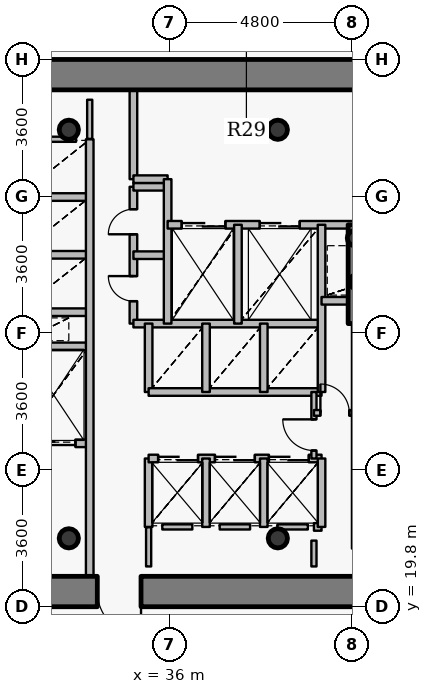
"""IFC4 building model, lengths in metres.
Left out: names, types, materials, properties, quantities, classifications, styles, units other than length and angle.
Written with IfcOpenShell. Run it as: python <this file> out.ifc"""

import sys

from ifc_helpers import new_model, si_unit, direction, frame, frame_2d, origin, origin_2d, place, context, subcontext, project, spatial, rectangle, hollow_circle, extrude, source, transform, mapped, element, fill, save


model = new_model("IFC4")
c1 = context("Model", 3, precision=1e-05, world=origin(), true_north=direction((0.0, 1.0)))
c2 = subcontext(c1, "Body", "Model", "MODEL_VIEW")
j1 = project(units=[si_unit("LENGTHUNIT", "METRE"), si_unit("PLANEANGLEUNIT", "RADIAN")], contexts=[c1])
p1 = place(None, origin())
s1 = spatial("IfcSite", under=j1, at=p1, CompositionType="ELEMENT")
p2 = place(p1, origin())
s2 = spatial("IfcBuilding", under=s1, at=p2, CompositionType="ELEMENT")
p3 = place(p2, frame((0.0, 0.0, 115.95)))
s3 = spatial("IfcBuildingStorey", under=s2, at=p3, CompositionType="ELEMENT", Elevation=115.95)
for number, where, z_axis, x_axis in (
    (1, (33.35, 21.6, 0.0), (0.0, 0.0, 1.0), (1.0, 0.0, 0.0)),
    (2, (38.85, 21.6, 0.0), (0.0, 0.0, 1.0), (1.0, 0.0, 0.0)),
    (3, (38.85, 32.35, 0.0), (0.0, 0.0, 1.0), (1.0, 0.0, 0.0)),
    (4, (33.35, 32.35, 0.0), (0.0, 0.0, 1.0), (1.0, 0.0, 0.0)),
):
    element("IfcColumn", number, at=place(p3, frame(where, z_axis=z_axis, x_axis=x_axis)), inside=s3, PredefinedType="COLUMN", context=c2, shape_type="SweptSolid", body=[
        extrude(hollow_circle(Radius=0.254, WallThickness=0.02, at=origin_2d()), origin(), (0.0, 0.0, 1.0), 3.75),
    ])
for number, where, z_axis, x_axis in (
    (5, (40.95, 28.35, 0.0), (0.0, 0.0, 1.0), (1.0, 0.0, 0.0)),
    (6, (40.88, 29.5, 0.0), (0.0, 0.0, 1.0), (1.0, 0.0, 0.0)),
):
    element("IfcColumn", number, at=place(p3, frame(where, z_axis=z_axis, x_axis=x_axis)), inside=s3, PredefinedType="COLUMN", context=c2, shape_type="SweptSolid", body=[
        extrude(hollow_circle(Radius=0.203, WallThickness=0.016, at=origin_2d()), origin(), (0.0, 0.0, 1.0), 3.75),
    ])
p4 = place(p3, frame((26.6, 33.8, 0.0), z_axis=(0.0, 0.0, 1.0), x_axis=(1.0, 0.0, 0.0)))
e7 = element("IfcWall", 7, at=p4, inside=s3, PredefinedType="SHEAR", context=c2, shape_type="SweptSolid", body=[
    extrude(rectangle(XDim=18.8, YDim=0.8, at=frame_2d((9.4, 0.0))), origin(), (0.0, 0.0, 1.0), 2.95),
])
p5 = place(p3, frame((45.4, 20.2, 0.0), z_axis=(0.0, 0.0, 1.0), x_axis=(-1.0, 0.0, 0.0)))
e8 = element("IfcWall", 8, at=p5, inside=s3, PredefinedType="SHEAR", context=c2, shape_type="SweptSolid", body=[
    extrude(rectangle(XDim=18.8, YDim=0.8, at=frame_2d((9.4, 0.0))), origin(), (0.0, 0.0, 1.0), 2.95),
])
p6 = place(p5, frame((10.15, 0.0, 0.0)))
e9 = element("IfcOpeningElement", 9, at=p6, cuts=e8, PredefinedType="OPENING", context=c2, shape_type="SweptSolid", body=[
    extrude(rectangle(XDim=1.15, YDim=2.15, at=origin_2d()), frame((0.575, 0.41, 1.075), z_axis=(0.0, -1.0, 0.0), x_axis=(1.0, 0.0, 0.0)), (0.0, 0.0, 1.0), 0.82),
])
p7 = place(p3, frame((40.9, 27.25, 0.0), z_axis=(0.0, 0.0, 1.0), x_axis=(0.0, 1.0, 0.0)))
e10 = element("IfcWall", 10, at=p7, inside=s3, PredefinedType="SHEAR", context=c2, shape_type="SweptSolid", body=[
    extrude(rectangle(XDim=2.6, YDim=0.4, at=frame_2d((1.3, 0.0))), origin(), (0.0, 0.0, 1.0), 3.1),
])
p8 = place(p3, frame((32.0, 24.1, 0.0), z_axis=(0.0, 0.0, 1.0), x_axis=(1.0, 0.0, 0.0)))
e11 = element("IfcWall", 11, at=p8, inside=s3, PredefinedType="PARTITIONING", context=c2, shape_type="SweptSolid", body=[
    extrude(rectangle(XDim=1.9, YDim=0.2, at=frame_2d((0.95, 0.0))), origin(), (0.0, 0.0, 1.0), 3.085),
])
p9 = place(p8, frame((0.375, 0.0, 0.0)))
e12 = element("IfcOpeningElement", 12, at=p9, cuts=e11, PredefinedType="OPENING", context=c2, shape_type="SweptSolid", body=[
    extrude(rectangle(XDim=1.15, YDim=2.15, at=origin_2d()), frame((0.575, 0.11, 1.075), z_axis=(0.0, -1.0, 0.0), x_axis=(1.0, 0.0, 0.0)), (0.0, 0.0, 1.0), 0.22),
])
for number, where, z_axis, x_axis in (
    (13, (32.0, 26.65, 0.0), (0.0, 0.0, 1.0), (1.0, 0.0, 0.0)),
    (14, (32.0, 27.55, 0.0), (0.0, 0.0, 1.0), (1.0, 0.0, 0.0)),
    (15, (32.0, 29.06, 0.0), (0.0, 0.0, 1.0), (1.0, 0.0, 0.0)),
    (16, (32.0, 30.58, 0.0), (0.0, 0.0, 1.0), (1.0, 0.0, 0.0)),
):
    element("IfcWall", number, at=place(p3, frame(where, z_axis=z_axis, x_axis=x_axis)), inside=s3, PredefinedType="PARTITIONING", context=c2, shape_type="SweptSolid", body=[
        extrude(rectangle(XDim=1.9, YDim=0.2, at=frame_2d((0.95, 0.0))), origin(), (0.0, 0.0, 1.0), 3.085),
    ])
p10 = place(p3, frame((33.9, 20.6, 0.0), z_axis=(0.0, 0.0, 1.0), x_axis=(0.0, 1.0, 0.0)))
e17 = element("IfcWall", 17, at=p10, inside=s3, PredefinedType="PARTITIONING", context=c2, shape_type="SweptSolid", body=[
    extrude(rectangle(XDim=11.5, YDim=0.2, at=frame_2d((5.75, 0.0))), origin(), (0.0, 0.0, 1.0), 3.085),
])
p11 = place(p3, frame((35.05, 27.25, 0.0), z_axis=(0.0, 0.0, 1.0), x_axis=(0.0, 1.0, 0.0)))
e18 = element("IfcWall", 18, at=p11, inside=s3, PredefinedType="PARTITIONING", context=c2, shape_type="SweptSolid", body=[
    extrude(rectangle(XDim=3.6, YDim=0.2, at=frame_2d((1.8, 0.0))), origin(), (0.0, 0.0, 1.0), 3.5),
])
p12 = place(p11, frame((0.59, 0.0, 0.0)))
e19 = element("IfcOpeningElement", 19, at=p12, cuts=e18, PredefinedType="OPENING", context=c2, shape_type="SweptSolid", body=[
    extrude(rectangle(XDim=0.66, YDim=2.05, at=origin_2d()), frame((0.33, 0.11, 1.025), z_axis=(0.0, -1.0, 0.0), x_axis=(1.0, 0.0, 0.0)), (0.0, 0.0, 1.0), 0.22),
])
p13 = place(p11, frame((2.35, 0.0, 0.0)))
e20 = element("IfcOpeningElement", 20, at=p13, cuts=e18, PredefinedType="OPENING", context=c2, shape_type="SweptSolid", body=[
    extrude(rectangle(XDim=0.66, YDim=2.05, at=origin_2d()), frame((0.33, 0.11, 1.025), z_axis=(0.0, -1.0, 0.0), x_axis=(1.0, 0.0, 0.0)), (0.0, 0.0, 1.0), 0.22),
])
p14 = place(p3, frame((35.05, 27.25, 0.0), z_axis=(0.0, 0.0, 1.0), x_axis=(1.0, 0.0, 0.0)))
e21 = element("IfcWall", 21, at=p14, inside=s3, PredefinedType="PARTITIONING", context=c2, shape_type="SweptSolid", body=[
    extrude(rectangle(XDim=4.95, YDim=0.2, at=frame_2d((2.475, 0.0))), origin(), (0.0, 0.0, 1.0), 3.085),
])
for number, where, z_axis, x_axis in (
    (22, (35.05, 29.05, 0.0), (0.0, 0.0, 1.0), (1.0, 0.0, 0.0)),
    (23, (35.05, 30.85, 0.0), (0.0, 0.0, 1.0), (1.0, 0.0, 0.0)),
):
    element("IfcWall", number, at=place(p3, frame(where, z_axis=z_axis, x_axis=x_axis)), inside=s3, PredefinedType="PARTITIONING", context=c2, shape_type="SweptSolid", body=[
        extrude(rectangle(XDim=0.9, YDim=0.2, at=frame_2d((0.45, 0.0))), origin(), (0.0, 0.0, 1.0), 3.5),
    ])
p15 = place(p3, frame((35.05, 31.05, 0.0), z_axis=(0.0, 0.0, 1.0), x_axis=(0.0, 1.0, 0.0)))
e24 = element("IfcWall", 24, at=p15, inside=s3, PredefinedType="PARTITIONING", context=c2, shape_type="SweptSolid", body=[
    extrude(rectangle(XDim=2.35, YDim=0.2, at=frame_2d((1.175, 0.0))), origin(), (0.0, 0.0, 1.0), 3.085),
])
p16 = place(p3, frame((35.05, 31.05, 0.0), z_axis=(0.0, 0.0, 1.0), x_axis=(1.0, 0.0, 0.0)))
e25 = element("IfcWall", 25, at=p16, inside=s3, PredefinedType="PARTITIONING", context=c2, shape_type="SweptSolid", body=[
    extrude(rectangle(XDim=0.9, YDim=0.2, at=frame_2d((0.45, 0.0))), origin(), (0.0, 0.0, 1.0), 3.5),
])
p17 = place(p3, frame((35.45, 21.9, 0.0), z_axis=(0.0, 0.0, 1.0), x_axis=(0.0, 1.0, 0.0)))
e26 = element("IfcWall", 26, at=p17, inside=s3, PredefinedType="PARTITIONING", context=c2, shape_type="SweptSolid", body=[
    extrude(rectangle(XDim=1.8, YDim=0.2, at=frame_2d((0.9, 0.0))), origin(), (0.0, 0.0, 1.0), 3.5),
])
p18 = place(p3, frame((35.45, 23.7, 0.0), z_axis=(0.0, 0.0, 1.0), x_axis=(1.0, 0.0, 0.0)))
e27 = element("IfcWall", 27, at=p18, inside=s3, PredefinedType="PARTITIONING", context=c2, shape_type="SweptSolid", body=[
    extrude(rectangle(XDim=4.55, YDim=0.2, at=frame_2d((2.275, 0.0))), origin(), (0.0, 0.0, 1.0), 3.085),
])
p19 = place(p18, frame((0.25, 0.0, 0.0)))
e28 = element("IfcOpeningElement", 28, at=p19, cuts=e27, PredefinedType="OPENING", context=c2, shape_type="SweptSolid", body=[
    extrude(rectangle(XDim=1.05, YDim=2.15, at=origin_2d()), frame((0.525, 0.11, 1.075), z_axis=(0.0, -1.0, 0.0), x_axis=(1.0, 0.0, 0.0)), (0.0, 0.0, 1.0), 0.22),
])
p20 = place(p18, frame((1.745, 0.0, 0.0)))
e29 = element("IfcOpeningElement", 29, at=p20, cuts=e27, PredefinedType="OPENING", context=c2, shape_type="SweptSolid", body=[
    extrude(rectangle(XDim=1.05, YDim=2.15, at=origin_2d()), frame((0.525, 0.11, 1.075), z_axis=(0.0, -1.0, 0.0), x_axis=(1.0, 0.0, 0.0)), (0.0, 0.0, 1.0), 0.22),
])
p21 = place(p18, frame((3.165, 0.0, 0.0)))
e30 = element("IfcOpeningElement", 30, at=p21, cuts=e27, PredefinedType="OPENING", context=c2, shape_type="SweptSolid", body=[
    extrude(rectangle(XDim=1.05, YDim=2.15, at=origin_2d()), frame((0.525, 0.11, 1.075), z_axis=(0.0, -1.0, 0.0), x_axis=(1.0, 0.0, 0.0)), (0.0, 0.0, 1.0), 0.22),
])
p22 = place(p3, frame((35.45, 25.45, 0.0), z_axis=(0.0, 0.0, 1.0), x_axis=(0.0, 1.0, 0.0)))
e31 = element("IfcWall", 31, at=p22, inside=s3, PredefinedType="PARTITIONING", context=c2, shape_type="SweptSolid", body=[
    extrude(rectangle(XDim=1.8, YDim=0.2, at=frame_2d((0.9, 0.0))), origin(), (0.0, 0.0, 1.0), 3.5),
])
p23 = place(p3, frame((35.45, 25.45, 0.0), z_axis=(0.0, 0.0, 1.0), x_axis=(1.0, 0.0, 0.0)))
e32 = element("IfcWall", 32, at=p23, inside=s3, PredefinedType="PARTITIONING", context=c2, shape_type="SweptSolid", body=[
    extrude(rectangle(XDim=4.55, YDim=0.2, at=frame_2d((2.275, 0.0))), origin(), (0.0, 0.0, 1.0), 3.085),
])
p24 = place(p3, frame((35.95, 27.25, 0.0), z_axis=(0.0, 0.0, 1.0), x_axis=(0.0, 1.0, 0.0)))
e33 = element("IfcWall", 33, at=p24, inside=s3, PredefinedType="PARTITIONING", context=c2, shape_type="SweptSolid", body=[
    extrude(rectangle(XDim=3.8, YDim=0.2, at=frame_2d((1.9, 0.0))), origin(), (0.0, 0.0, 1.0), 3.5),
])
p25 = place(p3, frame((35.95, 29.85, 0.0), z_axis=(0.0, 0.0, 1.0), x_axis=(1.0, 0.0, 0.0)))
e34 = element("IfcWall", 34, at=p25, inside=s3, PredefinedType="PARTITIONING", context=c2, shape_type="SweptSolid", body=[
    extrude(rectangle(XDim=8.49, YDim=0.2, at=frame_2d((4.245, 0.0))), origin(), (0.0, 0.0, 1.0), 3.085),
])
p26 = place(p25, frame((6.1, 0.0, 0.0)))
e35 = element("IfcOpeningElement", 35, at=p26, cuts=e34, PredefinedType="OPENING", context=c2, shape_type="SweptSolid", body=[
    extrude(rectangle(XDim=1.2, YDim=2.15, at=origin_2d()), frame((0.6, 0.11, 1.075), z_axis=(0.0, -1.0, 0.0), x_axis=(1.0, 0.0, 0.0)), (0.0, 0.0, 1.0), 0.22),
])
p27 = place(p25, frame((0.37, 0.0, 0.0)))
e36 = element("IfcOpeningElement", 36, at=p27, cuts=e34, PredefinedType="OPENING", context=c2, shape_type="SweptSolid", body=[
    extrude(rectangle(XDim=1.15, YDim=2.15, at=origin_2d()), frame((0.575, 0.11, 1.075), z_axis=(0.0, -1.0, 0.0), x_axis=(1.0, 0.0, 0.0)), (0.0, 0.0, 1.0), 0.22),
])
p28 = place(p25, frame((2.425, 0.0, 0.0)))
e37 = element("IfcOpeningElement", 37, at=p28, cuts=e34, PredefinedType="OPENING", context=c2, shape_type="SweptSolid", body=[
    extrude(rectangle(XDim=1.05, YDim=2.15, at=origin_2d()), frame((0.525, 0.11, 1.075), z_axis=(0.0, -1.0, 0.0), x_axis=(1.0, 0.0, 0.0)), (0.0, 0.0, 1.0), 0.22),
])
for number, where, z_axis, x_axis in (
    (38, (36.96, 21.9, 0.0), (0.0, 0.0, 1.0), (0.0, 1.0, 0.0)),
    (39, (36.96, 25.45, 0.0), (0.0, 0.0, 1.0), (0.0, 1.0, 0.0)),
):
    element("IfcWall", number, at=place(p3, frame(where, z_axis=z_axis, x_axis=x_axis)), inside=s3, PredefinedType="PARTITIONING", context=c2, shape_type="SweptSolid", body=[
        extrude(rectangle(XDim=1.8, YDim=0.2, at=frame_2d((0.9, 0.0))), origin(), (0.0, 0.0, 1.0), 3.5),
    ])
p29 = place(p3, frame((37.8, 27.25, 0.0), z_axis=(0.0, 0.0, 1.0), x_axis=(0.0, 1.0, 0.0)))
e40 = element("IfcWall", 40, at=p29, inside=s3, PredefinedType="PARTITIONING", context=c2, shape_type="SweptSolid", body=[
    extrude(rectangle(XDim=2.6, YDim=0.2, at=frame_2d((1.3, 0.0))), origin(), (0.0, 0.0, 1.0), 3.5),
])
for number, where, z_axis, x_axis in (
    (41, (38.48, 21.9, 0.0), (0.0, 0.0, 1.0), (0.0, 1.0, 0.0)),
    (42, (38.48, 25.45, 0.0), (0.0, 0.0, 1.0), (0.0, 1.0, 0.0)),
):
    element("IfcWall", number, at=place(p3, frame(where, z_axis=z_axis, x_axis=x_axis)), inside=s3, PredefinedType="PARTITIONING", context=c2, shape_type="SweptSolid", body=[
        extrude(rectangle(XDim=1.8, YDim=0.2, at=frame_2d((0.9, 0.0))), origin(), (0.0, 0.0, 1.0), 3.5),
    ])
p30 = place(p3, frame((39.8, 21.9, 0.0), z_axis=(0.0, 0.0, 1.0), x_axis=(1.0, 0.0, 0.0)))
e43 = element("IfcWall", 43, at=p30, inside=s3, PredefinedType="PARTITIONING", context=c2, shape_type="SweptSolid", body=[
    extrude(rectangle(XDim=0.2, YDim=0.2, at=frame_2d((0.1, 0.0))), origin(), (0.0, 0.0, 1.0), 3.5),
])
p31 = place(p3, frame((39.8, 23.7, 0.0), z_axis=(0.0, 0.0, 1.0), x_axis=(0.0, 1.0, 0.0)))
e44 = element("IfcWall", 44, at=p31, inside=s3, PredefinedType="PARTITIONING", context=c2, shape_type="SweptSolid", body=[
    extrude(rectangle(XDim=1.75, YDim=0.135, at=frame_2d((0.875, 0.0))), origin(), (0.0, 0.0, 1.0), 3.5),
])
p32 = place(p31, frame((0.21, 0.0, 0.0)))
e45 = element("IfcOpeningElement", 45, at=p32, cuts=e44, PredefinedType="OPENING", context=c2, shape_type="SweptSolid", body=[
    extrude(rectangle(XDim=0.82, YDim=2.1, at=origin_2d()), frame((0.41, 0.078, 1.05), z_axis=(0.0, -1.0, 0.0), x_axis=(1.0, 0.0, 0.0)), (0.0, 0.0, 1.0), 0.155),
])
p33 = place(p3, frame((39.8, 24.9, 0.0), z_axis=(0.0, 0.0, 1.0), x_axis=(1.0, 0.0, 0.0)))
e46 = element("IfcWall", 46, at=p33, inside=s3, PredefinedType="PARTITIONING", context=c2, shape_type="SweptSolid", body=[
    extrude(rectangle(XDim=1.1, YDim=0.15, at=frame_2d((0.55, 0.0))), origin(), (0.0, 0.0, 1.0), 3.5),
])
p34 = place(p33, frame((0.17, 0.0, 0.0)))
e47 = element("IfcOpeningElement", 47, at=p34, cuts=e46, PredefinedType="OPENING", context=c2, shape_type="SweptSolid", body=[
    extrude(rectangle(XDim=0.76, YDim=2.1, at=origin_2d()), frame((0.38, 0.085, 1.05), z_axis=(0.0, -1.0, 0.0), x_axis=(1.0, 0.0, 0.0)), (0.0, 0.0, 1.0), 0.17),
])
p35 = place(p3, frame((40.0, 21.9, 0.0), z_axis=(0.0, 0.0, 1.0), x_axis=(0.0, 1.0, 0.0)))
e48 = element("IfcWall", 48, at=p35, inside=s3, PredefinedType="PARTITIONING", context=c2, shape_type="SweptSolid", body=[
    extrude(rectangle(XDim=1.8, YDim=0.2, at=frame_2d((0.9, 0.0))), origin(), (0.0, 0.0, 1.0), 3.5),
])
p36 = place(p3, frame((40.0, 25.45, 0.0), z_axis=(0.0, 0.0, 1.0), x_axis=(0.0, 1.0, 0.0)))
e49 = element("IfcWall", 49, at=p36, inside=s3, PredefinedType="PARTITIONING", context=c2, shape_type="SweptSolid", body=[
    extrude(rectangle(XDim=4.4, YDim=0.2, at=frame_2d((2.2, 0.0))), origin(), (0.0, 0.0, 1.0), 3.5),
])
p37 = place(p3, frame((40.0, 27.85, 0.0), z_axis=(0.0, 0.0, 1.0), x_axis=(1.0, 0.0, 0.0)))
e50 = element("IfcWall", 50, at=p37, inside=s3, PredefinedType="PARTITIONING", context=c2, shape_type="SweptSolid", body=[
    extrude(rectangle(XDim=0.9, YDim=0.2, at=frame_2d((0.45, 0.0))), origin(), (0.0, 0.0, 1.0), 3.5),
])
p38 = place(p3, frame((40.9, 21.33, 0.0), z_axis=(0.0, 0.0, 1.0), x_axis=(0.0, 1.0, 0.0)))
e51 = element("IfcWall", 51, at=p38, inside=s3, PredefinedType="PARTITIONING", context=c2, shape_type="SweptSolid", body=[
    extrude(rectangle(XDim=5.91, YDim=0.2, at=frame_2d((2.955, 0.0))), origin(), (0.0, 0.0, 1.0), 3.035),
])
p39 = place(p3, frame((36.6, 21.9, 0.0), z_axis=(0.0, 0.0, 1.0), x_axis=(-1.0, 0.0, 0.0)))
e52 = element("IfcWall", 52, at=p39, inside=s3, PredefinedType="PARTITIONING", context=c2, shape_type="SweptSolid", body=[
    extrude(rectangle(XDim=0.79, YDim=0.135, at=frame_2d((0.395, 0.0))), origin(), (0.0, 0.0, 1.0), 3.5),
])
p40 = place(p3, frame((38.12, 21.9, 0.0), z_axis=(0.0, 0.0, 1.0), x_axis=(-1.0, 0.0, 0.0)))
e53 = element("IfcWall", 53, at=p40, inside=s3, PredefinedType="PARTITIONING", context=c2, shape_type="SweptSolid", body=[
    extrude(rectangle(XDim=0.8, YDim=0.135, at=frame_2d((0.4, 0.0))), origin(), (0.0, 0.0, 1.0), 3.5),
])
p41 = place(p3, frame((39.64, 21.9, 0.0), z_axis=(0.0, 0.0, 1.0), x_axis=(-1.0, 0.0, 0.0)))
e54 = element("IfcWall", 54, at=p41, inside=s3, PredefinedType="PARTITIONING", context=c2, shape_type="SweptSolid", body=[
    extrude(rectangle(XDim=0.8, YDim=0.135, at=frame_2d((0.4, 0.0))), origin(), (0.0, 0.0, 1.0), 3.085),
])
p42 = place(p3, frame((32.36, 32.1, 0.0), z_axis=(0.0, 0.0, 1.0), x_axis=(1.0, 0.0, 0.0)))
e55 = element("IfcWall", 55, at=p42, inside=s3, PredefinedType="PARTITIONING", context=c2, shape_type="SweptSolid", body=[
    extrude(rectangle(XDim=1.18, YDim=0.135, at=frame_2d((0.59, 0.0))), origin(), (0.0, 0.0, 1.0), 3.085),
])
p43 = place(p3, frame((39.8, 20.86, 0.0), z_axis=(0.0, 0.0, 1.0), x_axis=(0.0, 1.0, 0.0)))
e56 = element("IfcWall", 56, at=p43, inside=s3, PredefinedType="PARTITIONING", context=c2, shape_type="SweptSolid", body=[
    extrude(rectangle(XDim=0.68, YDim=0.135, at=frame_2d((0.34, 0.0))), origin(), (0.0, 0.0, 1.0), 3.035),
])
for number, where, z_axis, x_axis in (
    (57, (35.45, 21.89, 0.0), (0.0, 0.0, 1.0), (0.0, -1.0, 0.0)),
    (58, (33.9, 32.11, 0.0), (0.0, 0.0, 1.0), (0.0, 1.0, 0.0)),
):
    element("IfcWall", number, at=place(p3, frame(where, z_axis=z_axis, x_axis=x_axis)), inside=s3, PredefinedType="PARTITIONING", context=c2, shape_type="SweptSolid", body=[
        extrude(rectangle(XDim=1.03, YDim=0.135, at=frame_2d((0.515, 0.0))), origin(), (0.0, 0.0, 1.0), 3.085),
    ])
m1 = source(origin(), c2, "Body", "SweptSolid", [
    extrude(rectangle(XDim=1.15, YDim=2.15, at=origin_2d()), frame((0.575, 0.025, 1.075), z_axis=(0.0, -1.0, 0.0), x_axis=(1.0, 0.0, 0.0)), (0.0, 0.0, 1.0), 0.05),
])
p44 = place(p6, origin())
e59 = element("IfcDoor", 59, at=p44, inside=s3, OperationType="SINGLE_SWING_LEFT", PredefinedType="DOOR", context=c2, shape_type="MappedRepresentation", body=[
    mapped(m1, transform((0.0, 0.0, 0.0), x_axis=(1.0, 0.0, 0.0), y_axis=(0.0, 1.0, 0.0), z_axis=(0.0, 0.0, 1.0), scale=1.0)),
])
fill(e9, e59)
m2 = source(origin(), c2, "Body", "SweptSolid", [
    extrude(rectangle(XDim=1.15, YDim=2.15, at=origin_2d()), frame((0.575, 0.025, 1.075), z_axis=(0.0, -1.0, 0.0), x_axis=(1.0, 0.0, 0.0)), (0.0, 0.0, 1.0), 0.05),
])
p45 = place(p27, origin())
e60 = element("IfcDoor", 60, at=p45, inside=s3, OperationType="DOUBLE_DOOR_SLIDING", PredefinedType="USERDEFINED", context=c2, shape_type="MappedRepresentation", body=[
    mapped(m2, transform((0.0, 0.0, 0.0), x_axis=(1.0, 0.0, 0.0), y_axis=(0.0, 1.0, 0.0), z_axis=(0.0, 0.0, 1.0), scale=1.0)),
])
fill(e36, e60)
p46 = place(p9, origin())
e61 = element("IfcDoor", 61, at=p46, inside=s3, OperationType="DOUBLE_DOOR_SLIDING", PredefinedType="USERDEFINED", context=c2, shape_type="MappedRepresentation", body=[
    mapped(m2, transform((0.0, 0.0, 0.0), x_axis=(1.0, 0.0, 0.0), y_axis=(0.0, 1.0, 0.0), z_axis=(0.0, 0.0, 1.0), scale=1.0)),
])
fill(e12, e61)
m3 = source(origin(), c2, "Body", "SweptSolid", [
    extrude(rectangle(XDim=1.05, YDim=2.15, at=origin_2d()), frame((0.525, 0.025, 1.075), z_axis=(0.0, -1.0, 0.0), x_axis=(1.0, 0.0, 0.0)), (0.0, 0.0, 1.0), 0.05),
])
p47 = place(p28, origin())
e62 = element("IfcDoor", 62, at=p47, inside=s3, OperationType="DOUBLE_DOOR_SLIDING", PredefinedType="USERDEFINED", context=c2, shape_type="MappedRepresentation", body=[
    mapped(m3, transform((0.0, 0.0, 0.0), x_axis=(1.0, 0.0, 0.0), y_axis=(0.0, 1.0, 0.0), z_axis=(0.0, 0.0, 1.0), scale=1.0)),
])
fill(e37, e62)
p48 = place(p19, origin())
e63 = element("IfcDoor", 63, at=p48, inside=s3, OperationType="DOUBLE_DOOR_SLIDING", PredefinedType="USERDEFINED", context=c2, shape_type="MappedRepresentation", body=[
    mapped(m3, transform((0.0, 0.0, 0.0), x_axis=(1.0, 0.0, 0.0), y_axis=(0.0, 1.0, 0.0), z_axis=(0.0, 0.0, 1.0), scale=1.0)),
])
fill(e28, e63)
p49 = place(p20, origin())
e64 = element("IfcDoor", 64, at=p49, inside=s3, OperationType="DOUBLE_DOOR_SLIDING", PredefinedType="USERDEFINED", context=c2, shape_type="MappedRepresentation", body=[
    mapped(m3, transform((0.0, 0.0, 0.0), x_axis=(1.0, 0.0, 0.0), y_axis=(0.0, 1.0, 0.0), z_axis=(0.0, 0.0, 1.0), scale=1.0)),
])
fill(e29, e64)
p50 = place(p21, origin())
e65 = element("IfcDoor", 65, at=p50, inside=s3, OperationType="DOUBLE_DOOR_SLIDING", PredefinedType="USERDEFINED", context=c2, shape_type="MappedRepresentation", body=[
    mapped(m3, transform((0.0, 0.0, 0.0), x_axis=(1.0, 0.0, 0.0), y_axis=(0.0, 1.0, 0.0), z_axis=(0.0, 0.0, 1.0), scale=1.0)),
])
fill(e30, e65)
m4 = source(origin(), c2, "Body", "SweptSolid", [
    extrude(rectangle(XDim=0.66, YDim=2.05, at=origin_2d()), frame((0.33, 0.025, 1.025), z_axis=(0.0, -1.0, 0.0), x_axis=(1.0, 0.0, 0.0)), (0.0, 0.0, 1.0), 0.05),
])
p51 = place(p12, origin())
e66 = element("IfcDoor", 66, at=p51, inside=s3, OperationType="SINGLE_SWING_RIGHT", PredefinedType="USERDEFINED", context=c2, shape_type="MappedRepresentation", body=[
    mapped(m4, transform((0.0, 0.0, 0.0), x_axis=(1.0, 0.0, 0.0), y_axis=(0.0, 1.0, 0.0), z_axis=(0.0, 0.0, 1.0), scale=1.0)),
])
fill(e19, e66)
p52 = place(p13, origin())
e67 = element("IfcDoor", 67, at=p52, inside=s3, OperationType="SINGLE_SWING_LEFT", PredefinedType="USERDEFINED", context=c2, shape_type="MappedRepresentation", body=[
    mapped(m4, transform((0.0, 0.0, 0.0), x_axis=(1.0, 0.0, 0.0), y_axis=(0.0, 1.0, 0.0), z_axis=(0.0, 0.0, 1.0), scale=1.0)),
])
fill(e20, e67)
m5 = source(origin(), c2, "Body", "SweptSolid", [
    extrude(rectangle(XDim=0.82, YDim=2.1, at=origin_2d()), frame((0.41, 0.025, 1.05), z_axis=(0.0, -1.0, 0.0), x_axis=(1.0, 0.0, 0.0)), (0.0, 0.0, 1.0), 0.05),
])
p53 = place(p32, origin())
e68 = element("IfcDoor", 68, at=p53, inside=s3, OperationType="SINGLE_SWING_RIGHT", PredefinedType="DOOR", context=c2, shape_type="MappedRepresentation", body=[
    mapped(m5, transform((0.0, 0.0, 0.0), x_axis=(1.0, 0.0, 0.0), y_axis=(0.0, 1.0, 0.0), z_axis=(0.0, 0.0, 1.0), scale=1.0)),
])
fill(e45, e68)
m6 = source(origin(), c2, "Body", "SweptSolid", [
    extrude(rectangle(XDim=0.76, YDim=2.1, at=origin_2d()), frame((0.38, 0.025, 1.05), z_axis=(0.0, -1.0, 0.0), x_axis=(1.0, 0.0, 0.0)), (0.0, 0.0, 1.0), 0.05),
])
p54 = place(p34, origin())
e69 = element("IfcDoor", 69, at=p54, inside=s3, OperationType="SINGLE_SWING_LEFT", PredefinedType="DOOR", context=c2, shape_type="MappedRepresentation", body=[
    mapped(m6, transform((0.0, 0.0, 0.0), x_axis=(1.0, 0.0, 0.0), y_axis=(0.0, 1.0, 0.0), z_axis=(0.0, 0.0, 1.0), scale=1.0)),
])
fill(e47, e69)
save(model, sys.argv[1])
